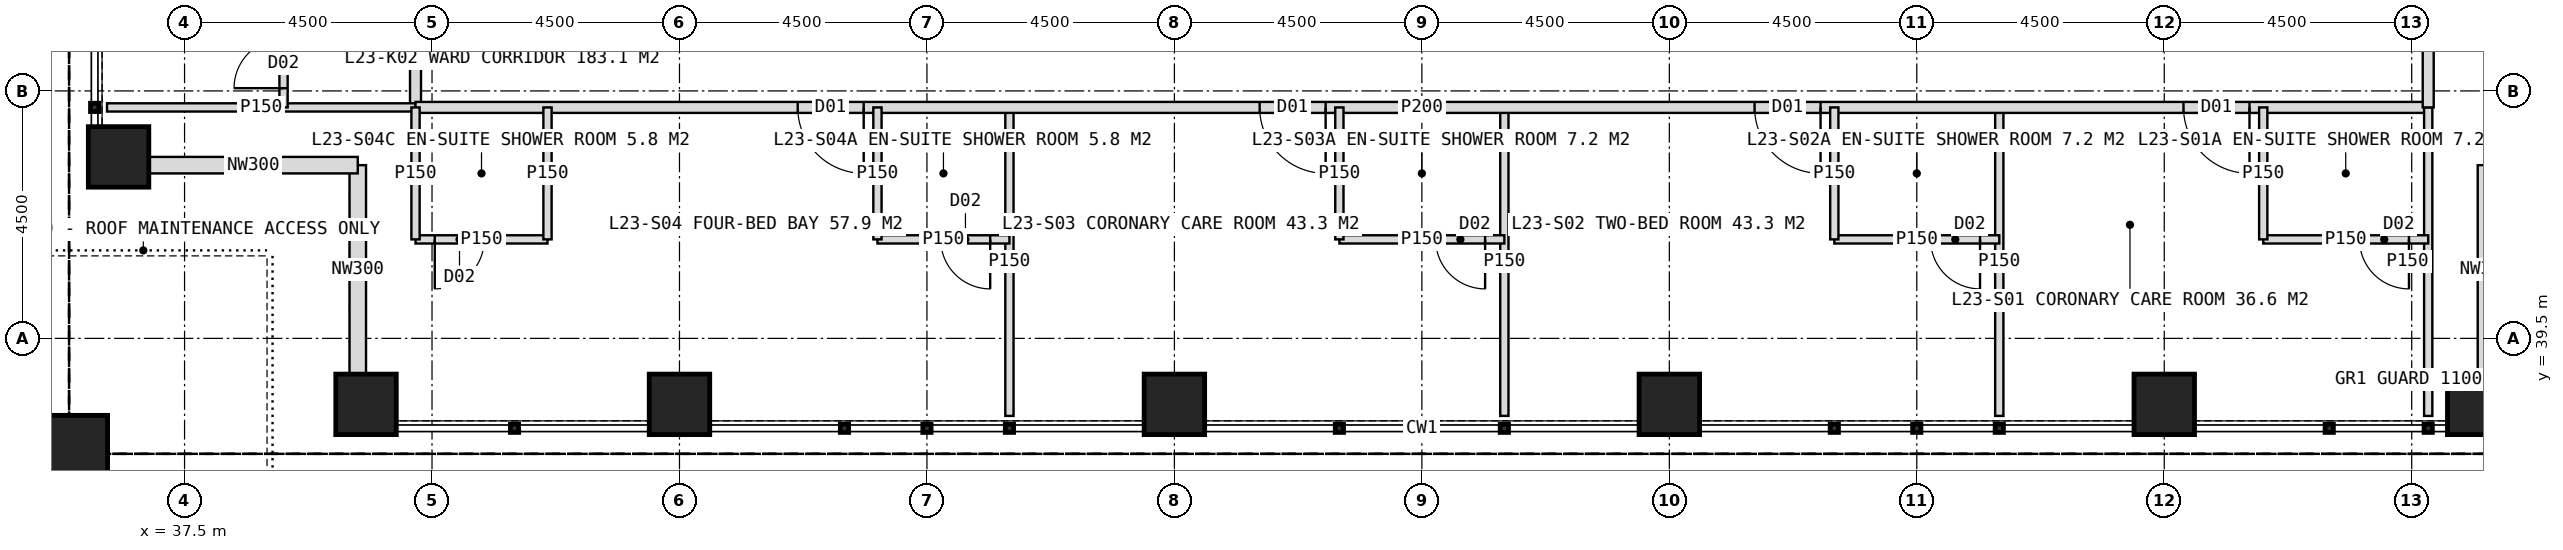
"""IFC4 building model, lengths in metres.
Left out: names, types, materials, properties, quantities, classifications, styles, units other than length and angle.
Written with IfcOpenShell. Run it as: python <this file> out.ifc"""

import sys

from ifc_helpers import new_model, si_unit, direction, frame, frame_2d, origin, origin_2d, place, context, subcontext, project, spatial, rectangle, hollow_rectangle, extrude, element, fill, save


model = new_model("IFC4")
c1 = context("Model", 3, precision=1e-05, world=origin(), true_north=direction((0.0, 1.0)))
c2 = subcontext(c1, "Body", "Model", "MODEL_VIEW")
j1 = project(units=[si_unit("LENGTHUNIT", "METRE"), si_unit("PLANEANGLEUNIT", "RADIAN")], contexts=[c1])
p1 = place(None, origin())
s1 = spatial("IfcSite", under=j1, at=p1, CompositionType="ELEMENT")
p2 = place(p1, origin())
s2 = spatial("IfcBuilding", under=s1, at=p2, CompositionType="ELEMENT")
p3 = place(p2, frame((0.0, 0.0, 100.0)))
s3 = spatial("IfcBuildingStorey", under=s2, at=p3, CompositionType="ELEMENT", Elevation=100.0)
for number, where, z_axis, x_axis in (
    (1, (40.8, 38.3, 0.0), (0.0, 0.0, 1.0), (1.0, 0.0, 0.0)),
    (2, (36.3, 42.8, 0.0), (0.0, 0.0, 1.0), (1.0, 0.0, 0.0)),
    (3, (46.5, 38.3, 0.0), (0.0, 0.0, 1.0), (1.0, 0.0, 0.0)),
    (4, (55.5, 38.3, 0.0), (0.0, 0.0, 1.0), (1.0, 0.0, 0.0)),
    (5, (64.5, 38.3, 0.0), (0.0, 0.0, 1.0), (1.0, 0.0, 0.0)),
    (6, (73.5, 38.3, 0.0), (0.0, 0.0, 1.0), (1.0, 0.0, 0.0)),
    (7, (79.2, 38.3, 0.0), (0.0, 0.0, 1.0), (1.0, 0.0, 0.0)),
):
    element("IfcColumn", number, at=place(p3, frame(where, z_axis=z_axis, x_axis=x_axis)), inside=s3, PredefinedType="COLUMN", context=c2, shape_type="SweptSolid", body=[
        extrude(hollow_rectangle(XDim=1.1, YDim=1.1, WallThickness=0.1, at=origin_2d()), origin(), (0.0, 0.0, 1.0), 4.0),
    ])
p4 = place(p3, frame((35.4, 37.4, 2.0), z_axis=(0.0, 0.0, 1.0), x_axis=(1.0, 0.0, 0.0)))
e8 = element("IfcColumn", 8, at=p4, inside=s3, PredefinedType="COLUMN", context=c2, shape_type="SweptSolid", body=[
    extrude(hollow_rectangle(XDim=1.4, YDim=1.4, WallThickness=0.08, at=origin_2d()), origin(), (0.0, 0.0, 1.0), 2.0),
])
for number, where, z_axis, x_axis in (
    (9, (40.65, 38.85, 0.0), (0.0, 0.0, 1.0), (0.0, 1.0, 0.0)),
    (10, (40.65, 42.65, 0.0), (0.0, 0.0, 1.0), (-1.0, 0.0, 0.0)),
    (11, (79.35, 42.65, 0.0), (0.0, 0.0, 1.0), (0.0, -1.0, 0.0)),
):
    element("IfcWall", number, at=place(p3, frame(where, z_axis=z_axis, x_axis=x_axis)), inside=s3, PredefinedType="ELEMENTEDWALL", context=c2, shape_type="SweptSolid", body=[
        extrude(rectangle(XDim=3.8, YDim=0.3, at=frame_2d((1.9, 0.0))), origin(), (0.0, 0.0, 1.0), 4.0),
    ])
p5 = place(p3, frame((41.7, 43.7, 0.0), z_axis=(0.0, 0.0, 1.0), x_axis=(0.0, 1.0, 0.0)))
e12 = element("IfcWall", 12, at=p5, inside=s3, PredefinedType="PARTITIONING", context=c2, shape_type="SweptSolid", body=[
    extrude(rectangle(XDim=36.6, YDim=0.2, at=frame_2d((18.3, 0.0))), origin(), (0.0, 0.0, 1.0), 3.75),
])
p6 = place(p5, frame((3.25, 0.0, 0.0)))
e13 = element("IfcOpeningElement", 13, at=p6, cuts=e12, PredefinedType="OPENING", context=c2, shape_type="SweptSolid", body=[
    extrude(rectangle(XDim=1.2, YDim=2.2, at=frame_2d((0.6, 1.1))), frame((0.0, 0.11, 0.0), z_axis=(0.0, -1.0, 0.0), x_axis=(1.0, 0.0, 0.0)), (0.0, 0.0, 1.0), 0.22),
])
p7 = place(p5, frame((11.05, 0.0, 0.0)))
e14 = element("IfcOpeningElement", 14, at=p7, cuts=e12, PredefinedType="OPENING", context=c2, shape_type="SweptSolid", body=[
    extrude(rectangle(XDim=1.2, YDim=2.2, at=frame_2d((0.6, 1.1))), frame((0.0, 0.11, 0.0), z_axis=(0.0, -1.0, 0.0), x_axis=(1.0, 0.0, 0.0)), (0.0, 0.0, 1.0), 0.22),
])
p8 = place(p5, frame((21.55, 0.0, 0.0)))
e15 = element("IfcOpeningElement", 15, at=p8, cuts=e12, PredefinedType="OPENING", context=c2, shape_type="SweptSolid", body=[
    extrude(rectangle(XDim=1.2, YDim=2.2, at=frame_2d((0.6, 1.1))), frame((0.0, 0.11, 0.0), z_axis=(0.0, -1.0, 0.0), x_axis=(1.0, 0.0, 0.0)), (0.0, 0.0, 1.0), 0.22),
])
p9 = place(p5, frame((32.05, 0.0, 0.0)))
e16 = element("IfcOpeningElement", 16, at=p9, cuts=e12, PredefinedType="OPENING", context=c2, shape_type="SweptSolid", body=[
    extrude(rectangle(XDim=1.2, YDim=2.2, at=frame_2d((0.6, 1.1))), frame((0.0, 0.11, 0.0), z_axis=(0.0, -1.0, 0.0), x_axis=(1.0, 0.0, 0.0)), (0.0, 0.0, 1.0), 0.22),
])
p10 = place(p3, frame((41.7, 43.7, 0.0), z_axis=(0.0, 0.0, 1.0), x_axis=(-1.0, 0.0, 0.0)))
e17 = element("IfcWall", 17, at=p10, inside=s3, PredefinedType="PARTITIONING", context=c2, shape_type="SweptSolid", body=[
    extrude(rectangle(XDim=5.61, YDim=0.15, at=frame_2d((2.805, 0.0))), origin(), (0.0, 0.0, 1.0), 3.75),
])
p11 = place(p3, frame((39.3, 43.7, 0.0), z_axis=(0.0, 0.0, 1.0), x_axis=(0.0, 1.0, 0.0)))
e18 = element("IfcWall", 18, at=p11, inside=s3, PredefinedType="PARTITIONING", context=c2, shape_type="SweptSolid", body=[
    extrude(rectangle(XDim=3.0, YDim=0.15, at=frame_2d((1.5, 0.0))), origin(), (0.0, 0.0, 1.0), 3.75),
])
p12 = place(p11, frame((0.35, 0.0, 0.0)))
e19 = element("IfcOpeningElement", 19, at=p12, cuts=e18, PredefinedType="OPENING", context=c2, shape_type="SweptSolid", body=[
    extrude(rectangle(XDim=0.9, YDim=2.1, at=frame_2d((0.45, 1.05))), frame((0.0, 0.085, 0.0), z_axis=(0.0, -1.0, 0.0), x_axis=(1.0, 0.0, 0.0)), (0.0, 0.0, 1.0), 0.17),
])
for number, where, z_axis, x_axis in (
    (20, (70.5, 43.7, 0.0), (0.0, 0.0, 1.0), (0.0, -1.0, 0.0)),
    (21, (61.5, 43.7, 0.0), (0.0, 0.0, 1.0), (0.0, -1.0, 0.0)),
    (22, (52.5, 43.7, 0.0), (0.0, 0.0, 1.0), (0.0, -1.0, 0.0)),
):
    element("IfcWall", number, at=place(p3, frame(where, z_axis=z_axis, x_axis=x_axis)), inside=s3, PredefinedType="PARTITIONING", context=c2, shape_type="SweptSolid", body=[
        extrude(rectangle(XDim=5.61, YDim=0.15, at=frame_2d((2.805, 0.0))), origin(), (0.0, 0.0, 1.0), 3.75),
    ])
p13 = place(p3, frame((78.3, 43.7, 0.0), z_axis=(0.0, 0.0, 1.0), x_axis=(-1.0, 0.0, 0.0)))
e23 = element("IfcWall", 23, at=p13, inside=s3, PredefinedType="PARTITIONING", context=c2, shape_type="SweptSolid", body=[
    extrude(rectangle(XDim=36.6, YDim=0.2, at=frame_2d((18.3, 0.0))), origin(), (0.0, 0.0, 1.0), 3.75),
])
p14 = place(p13, frame((3.25, 0.0, 0.0)))
e24 = element("IfcOpeningElement", 24, at=p14, cuts=e23, PredefinedType="OPENING", context=c2, shape_type="SweptSolid", body=[
    extrude(rectangle(XDim=1.2, YDim=2.2, at=frame_2d((0.6, 1.1))), frame((0.0, 0.11, 0.0), z_axis=(0.0, -1.0, 0.0), x_axis=(1.0, 0.0, 0.0)), (0.0, 0.0, 1.0), 0.22),
])
p15 = place(p13, frame((11.05, 0.0, 0.0)))
e25 = element("IfcOpeningElement", 25, at=p15, cuts=e23, PredefinedType="OPENING", context=c2, shape_type="SweptSolid", body=[
    extrude(rectangle(XDim=1.2, YDim=2.2, at=frame_2d((0.6, 1.1))), frame((0.0, 0.11, 0.0), z_axis=(0.0, -1.0, 0.0), x_axis=(1.0, 0.0, 0.0)), (0.0, 0.0, 1.0), 0.22),
])
p16 = place(p13, frame((20.05, 0.0, 0.0)))
e26 = element("IfcOpeningElement", 26, at=p16, cuts=e23, PredefinedType="OPENING", context=c2, shape_type="SweptSolid", body=[
    extrude(rectangle(XDim=1.2, YDim=2.2, at=frame_2d((0.6, 1.1))), frame((0.0, 0.11, 0.0), z_axis=(0.0, -1.0, 0.0), x_axis=(1.0, 0.0, 0.0)), (0.0, 0.0, 1.0), 0.22),
])
p17 = place(p13, frame((28.45, 0.0, 0.0)))
e27 = element("IfcOpeningElement", 27, at=p17, cuts=e23, PredefinedType="OPENING", context=c2, shape_type="SweptSolid", body=[
    extrude(rectangle(XDim=1.2, YDim=2.2, at=frame_2d((0.6, 1.1))), frame((0.0, 0.11, 0.0), z_axis=(0.0, -1.0, 0.0), x_axis=(1.0, 0.0, 0.0)), (0.0, 0.0, 1.0), 0.22),
])
p18 = place(p3, frame((78.3, 43.7, 0.0), z_axis=(0.0, 0.0, 1.0), x_axis=(0.0, -1.0, 0.0)))
e28 = element("IfcWall", 28, at=p18, inside=s3, PredefinedType="PARTITIONING", context=c2, shape_type="SweptSolid", body=[
    extrude(rectangle(XDim=5.61, YDim=0.15, at=frame_2d((2.805, 0.0))), origin(), (0.0, 0.0, 1.0), 3.75),
])
p19 = place(p3, frame((78.3, 41.3, 0.0), z_axis=(0.0, 0.0, 1.0), x_axis=(-1.0, 0.0, 0.0)))
e29 = element("IfcWall", 29, at=p19, inside=s3, PredefinedType="PARTITIONING", context=c2, shape_type="SweptSolid", body=[
    extrude(rectangle(XDim=3.0, YDim=0.15, at=frame_2d((1.5, 0.0))), origin(), (0.0, 0.0, 1.0), 3.75),
])
p20 = place(p19, frame((0.35, 0.0, 0.0)))
e30 = element("IfcOpeningElement", 30, at=p20, cuts=e29, PredefinedType="OPENING", context=c2, shape_type="SweptSolid", body=[
    extrude(rectangle(XDim=0.9, YDim=2.1, at=frame_2d((0.45, 1.05))), frame((0.0, 0.085, 0.0), z_axis=(0.0, -1.0, 0.0), x_axis=(1.0, 0.0, 0.0)), (0.0, 0.0, 1.0), 0.17),
])
p21 = place(p3, frame((75.3, 43.7, 0.0), z_axis=(0.0, 0.0, 1.0), x_axis=(0.0, -1.0, 0.0)))
e31 = element("IfcWall", 31, at=p21, inside=s3, PredefinedType="PARTITIONING", context=c2, shape_type="SweptSolid", body=[
    extrude(rectangle(XDim=2.4, YDim=0.15, at=frame_2d((1.2, 0.0))), origin(), (0.0, 0.0, 1.0), 3.75),
])
p22 = place(p3, frame((70.5, 41.3, 0.0), z_axis=(0.0, 0.0, 1.0), x_axis=(-1.0, 0.0, 0.0)))
e32 = element("IfcWall", 32, at=p22, inside=s3, PredefinedType="PARTITIONING", context=c2, shape_type="SweptSolid", body=[
    extrude(rectangle(XDim=3.0, YDim=0.15, at=frame_2d((1.5, 0.0))), origin(), (0.0, 0.0, 1.0), 3.75),
])
p23 = place(p22, frame((0.35, 0.0, 0.0)))
e33 = element("IfcOpeningElement", 33, at=p23, cuts=e32, PredefinedType="OPENING", context=c2, shape_type="SweptSolid", body=[
    extrude(rectangle(XDim=0.9, YDim=2.1, at=frame_2d((0.45, 1.05))), frame((0.0, 0.085, 0.0), z_axis=(0.0, -1.0, 0.0), x_axis=(1.0, 0.0, 0.0)), (0.0, 0.0, 1.0), 0.17),
])
p24 = place(p3, frame((67.5, 43.7, 0.0), z_axis=(0.0, 0.0, 1.0), x_axis=(0.0, -1.0, 0.0)))
e34 = element("IfcWall", 34, at=p24, inside=s3, PredefinedType="PARTITIONING", context=c2, shape_type="SweptSolid", body=[
    extrude(rectangle(XDim=2.4, YDim=0.15, at=frame_2d((1.2, 0.0))), origin(), (0.0, 0.0, 1.0), 3.75),
])
p25 = place(p3, frame((61.5, 41.3, 0.0), z_axis=(0.0, 0.0, 1.0), x_axis=(-1.0, 0.0, 0.0)))
e35 = element("IfcWall", 35, at=p25, inside=s3, PredefinedType="PARTITIONING", context=c2, shape_type="SweptSolid", body=[
    extrude(rectangle(XDim=3.0, YDim=0.15, at=frame_2d((1.5, 0.0))), origin(), (0.0, 0.0, 1.0), 3.75),
])
p26 = place(p25, frame((0.35, 0.0, 0.0)))
e36 = element("IfcOpeningElement", 36, at=p26, cuts=e35, PredefinedType="OPENING", context=c2, shape_type="SweptSolid", body=[
    extrude(rectangle(XDim=0.9, YDim=2.1, at=frame_2d((0.45, 1.05))), frame((0.0, 0.085, 0.0), z_axis=(0.0, -1.0, 0.0), x_axis=(1.0, 0.0, 0.0)), (0.0, 0.0, 1.0), 0.17),
])
p27 = place(p3, frame((58.5, 43.7, 0.0), z_axis=(0.0, 0.0, 1.0), x_axis=(0.0, -1.0, 0.0)))
e37 = element("IfcWall", 37, at=p27, inside=s3, PredefinedType="PARTITIONING", context=c2, shape_type="SweptSolid", body=[
    extrude(rectangle(XDim=2.4, YDim=0.15, at=frame_2d((1.2, 0.0))), origin(), (0.0, 0.0, 1.0), 3.75),
])
p28 = place(p3, frame((52.5, 41.3, 0.0), z_axis=(0.0, 0.0, 1.0), x_axis=(-1.0, 0.0, 0.0)))
e38 = element("IfcWall", 38, at=p28, inside=s3, PredefinedType="PARTITIONING", context=c2, shape_type="SweptSolid", body=[
    extrude(rectangle(XDim=2.4, YDim=0.15, at=frame_2d((1.2, 0.0))), origin(), (0.0, 0.0, 1.0), 3.75),
])
p29 = place(p28, frame((0.35, 0.0, 0.0)))
e39 = element("IfcOpeningElement", 39, at=p29, cuts=e38, PredefinedType="OPENING", context=c2, shape_type="SweptSolid", body=[
    extrude(rectangle(XDim=0.9, YDim=2.1, at=frame_2d((0.45, 1.05))), frame((0.0, 0.085, 0.0), z_axis=(0.0, -1.0, 0.0), x_axis=(1.0, 0.0, 0.0)), (0.0, 0.0, 1.0), 0.17),
])
p30 = place(p3, frame((50.1, 43.7, 0.0), z_axis=(0.0, 0.0, 1.0), x_axis=(0.0, -1.0, 0.0)))
e40 = element("IfcWall", 40, at=p30, inside=s3, PredefinedType="PARTITIONING", context=c2, shape_type="SweptSolid", body=[
    extrude(rectangle(XDim=2.4, YDim=0.15, at=frame_2d((1.2, 0.0))), origin(), (0.0, 0.0, 1.0), 3.75),
])
p31 = place(p3, frame((44.1, 41.3, 0.0), z_axis=(0.0, 0.0, 1.0), x_axis=(-1.0, 0.0, 0.0)))
e41 = element("IfcWall", 41, at=p31, inside=s3, PredefinedType="PARTITIONING", context=c2, shape_type="SweptSolid", body=[
    extrude(rectangle(XDim=2.4, YDim=0.15, at=frame_2d((1.2, 0.0))), origin(), (0.0, 0.0, 1.0), 3.75),
])
p32 = place(p31, frame((1.15, 0.0, 0.0)))
e42 = element("IfcOpeningElement", 42, at=p32, cuts=e41, PredefinedType="OPENING", context=c2, shape_type="SweptSolid", body=[
    extrude(rectangle(XDim=0.9, YDim=2.1, at=frame_2d((0.45, 1.05))), frame((0.0, 0.085, 0.0), z_axis=(0.0, -1.0, 0.0), x_axis=(1.0, 0.0, 0.0)), (0.0, 0.0, 1.0), 0.17),
])
for number, where, z_axis, x_axis in (
    (43, (44.1, 43.7, 0.0), (0.0, 0.0, 1.0), (0.0, -1.0, 0.0)),
    (44, (41.7, 43.7, 0.0), (0.0, 0.0, 1.0), (0.0, -1.0, 0.0)),
):
    element("IfcWall", number, at=place(p3, frame(where, z_axis=z_axis, x_axis=x_axis)), inside=s3, PredefinedType="PARTITIONING", context=c2, shape_type="SweptSolid", body=[
        extrude(rectangle(XDim=2.4, YDim=0.15, at=frame_2d((1.2, 0.0))), origin(), (0.0, 0.0, 1.0), 3.75),
    ])
p33 = place(p3, frame((78.3, 80.3, 0.0), z_axis=(0.0, 0.0, 1.0), x_axis=(0.0, -1.0, 0.0)))
e45 = element("IfcWall", 45, at=p33, inside=s3, PredefinedType="PARTITIONING", context=c2, shape_type="SweptSolid", body=[
    extrude(rectangle(XDim=36.6, YDim=0.2, at=frame_2d((18.3, 0.0))), origin(), (0.0, 0.0, 1.0), 3.75),
])
p34 = place(p33, frame((3.25, 0.0, 0.0)))
e46 = element("IfcOpeningElement", 46, at=p34, cuts=e45, PredefinedType="OPENING", context=c2, shape_type="SweptSolid", body=[
    extrude(rectangle(XDim=1.2, YDim=2.2, at=frame_2d((0.6, 1.1))), frame((0.0, 0.11, 0.0), z_axis=(0.0, -1.0, 0.0), x_axis=(1.0, 0.0, 0.0)), (0.0, 0.0, 1.0), 0.22),
])
p35 = place(p33, frame((11.05, 0.0, 0.0)))
e47 = element("IfcOpeningElement", 47, at=p35, cuts=e45, PredefinedType="OPENING", context=c2, shape_type="SweptSolid", body=[
    extrude(rectangle(XDim=1.2, YDim=2.2, at=frame_2d((0.6, 1.1))), frame((0.0, 0.11, 0.0), z_axis=(0.0, -1.0, 0.0), x_axis=(1.0, 0.0, 0.0)), (0.0, 0.0, 1.0), 0.22),
])
p36 = place(p33, frame((21.55, 0.0, 0.0)))
e48 = element("IfcOpeningElement", 48, at=p36, cuts=e45, PredefinedType="OPENING", context=c2, shape_type="SweptSolid", body=[
    extrude(rectangle(XDim=1.2, YDim=2.2, at=frame_2d((0.6, 1.1))), frame((0.0, 0.11, 0.0), z_axis=(0.0, -1.0, 0.0), x_axis=(1.0, 0.0, 0.0)), (0.0, 0.0, 1.0), 0.22),
])
p37 = place(p33, frame((32.05, 0.0, 0.0)))
e49 = element("IfcOpeningElement", 49, at=p37, cuts=e45, PredefinedType="OPENING", context=c2, shape_type="SweptSolid", body=[
    extrude(rectangle(XDim=1.2, YDim=2.2, at=frame_2d((0.6, 1.1))), frame((0.0, 0.11, 0.0), z_axis=(0.0, -1.0, 0.0), x_axis=(1.0, 0.0, 0.0)), (0.0, 0.0, 1.0), 0.22),
])
p38 = place(p12, origin())
e50 = element("IfcDoor", 50, at=p38, inside=s3, OperationType="SINGLE_SWING_LEFT", PredefinedType="DOOR", context=c2, shape_type="SweptSolid", body=[
    extrude(rectangle(XDim=0.9, YDim=2.1, at=frame_2d((0.45, 1.05))), frame((0.0, 0.025, 0.0), z_axis=(0.0, -1.0, 0.0), x_axis=(1.0, 0.0, 0.0)), (0.0, 0.0, 1.0), 0.05),
])
fill(e19, e50)
p39 = place(p14, origin())
e51 = element("IfcDoor", 51, at=p39, inside=s3, OperationType="SINGLE_SWING_LEFT", PredefinedType="DOOR", context=c2, shape_type="SweptSolid", body=[
    extrude(rectangle(XDim=1.2, YDim=2.2, at=frame_2d((0.6, 1.1))), frame((0.0, 0.025, 0.0), z_axis=(0.0, -1.0, 0.0), x_axis=(1.0, 0.0, 0.0)), (0.0, 0.0, 1.0), 0.05),
])
fill(e24, e51)
p40 = place(p20, origin())
e52 = element("IfcDoor", 52, at=p40, inside=s3, OperationType="SINGLE_SWING_LEFT", PredefinedType="DOOR", context=c2, shape_type="SweptSolid", body=[
    extrude(rectangle(XDim=0.9, YDim=2.1, at=frame_2d((0.45, 1.05))), frame((0.0, 0.025, 0.0), z_axis=(0.0, -1.0, 0.0), x_axis=(1.0, 0.0, 0.0)), (0.0, 0.0, 1.0), 0.05),
])
fill(e30, e52)
p41 = place(p15, origin())
e53 = element("IfcDoor", 53, at=p41, inside=s3, OperationType="SINGLE_SWING_LEFT", PredefinedType="DOOR", context=c2, shape_type="SweptSolid", body=[
    extrude(rectangle(XDim=1.2, YDim=2.2, at=frame_2d((0.6, 1.1))), frame((0.0, 0.025, 0.0), z_axis=(0.0, -1.0, 0.0), x_axis=(1.0, 0.0, 0.0)), (0.0, 0.0, 1.0), 0.05),
])
fill(e25, e53)
p42 = place(p23, origin())
e54 = element("IfcDoor", 54, at=p42, inside=s3, OperationType="SINGLE_SWING_LEFT", PredefinedType="DOOR", context=c2, shape_type="SweptSolid", body=[
    extrude(rectangle(XDim=0.9, YDim=2.1, at=frame_2d((0.45, 1.05))), frame((0.0, 0.025, 0.0), z_axis=(0.0, -1.0, 0.0), x_axis=(1.0, 0.0, 0.0)), (0.0, 0.0, 1.0), 0.05),
])
fill(e33, e54)
p43 = place(p16, origin())
e55 = element("IfcDoor", 55, at=p43, inside=s3, OperationType="SINGLE_SWING_LEFT", PredefinedType="DOOR", context=c2, shape_type="SweptSolid", body=[
    extrude(rectangle(XDim=1.2, YDim=2.2, at=frame_2d((0.6, 1.1))), frame((0.0, 0.025, 0.0), z_axis=(0.0, -1.0, 0.0), x_axis=(1.0, 0.0, 0.0)), (0.0, 0.0, 1.0), 0.05),
])
fill(e26, e55)
p44 = place(p26, origin())
e56 = element("IfcDoor", 56, at=p44, inside=s3, OperationType="SINGLE_SWING_LEFT", PredefinedType="DOOR", context=c2, shape_type="SweptSolid", body=[
    extrude(rectangle(XDim=0.9, YDim=2.1, at=frame_2d((0.45, 1.05))), frame((0.0, 0.025, 0.0), z_axis=(0.0, -1.0, 0.0), x_axis=(1.0, 0.0, 0.0)), (0.0, 0.0, 1.0), 0.05),
])
fill(e36, e56)
p45 = place(p17, origin())
e57 = element("IfcDoor", 57, at=p45, inside=s3, OperationType="SINGLE_SWING_LEFT", PredefinedType="DOOR", context=c2, shape_type="SweptSolid", body=[
    extrude(rectangle(XDim=1.2, YDim=2.2, at=frame_2d((0.6, 1.1))), frame((0.0, 0.025, 0.0), z_axis=(0.0, -1.0, 0.0), x_axis=(1.0, 0.0, 0.0)), (0.0, 0.0, 1.0), 0.05),
])
fill(e27, e57)
p46 = place(p29, origin())
e58 = element("IfcDoor", 58, at=p46, inside=s3, OperationType="SINGLE_SWING_LEFT", PredefinedType="DOOR", context=c2, shape_type="SweptSolid", body=[
    extrude(rectangle(XDim=0.9, YDim=2.1, at=frame_2d((0.45, 1.05))), frame((0.0, 0.025, 0.0), z_axis=(0.0, -1.0, 0.0), x_axis=(1.0, 0.0, 0.0)), (0.0, 0.0, 1.0), 0.05),
])
fill(e39, e58)
p47 = place(p32, origin())
e59 = element("IfcDoor", 59, at=p47, inside=s3, OperationType="SINGLE_SWING_RIGHT", PredefinedType="DOOR", context=c2, shape_type="SweptSolid", body=[
    extrude(rectangle(XDim=0.9, YDim=2.1, at=frame_2d((0.45, 1.05))), frame((0.0, 0.025, 0.0), z_axis=(0.0, -1.0, 0.0), x_axis=(1.0, 0.0, 0.0)), (0.0, 0.0, 1.0), 0.05),
])
fill(e42, e59)
save(model, sys.argv[1])
